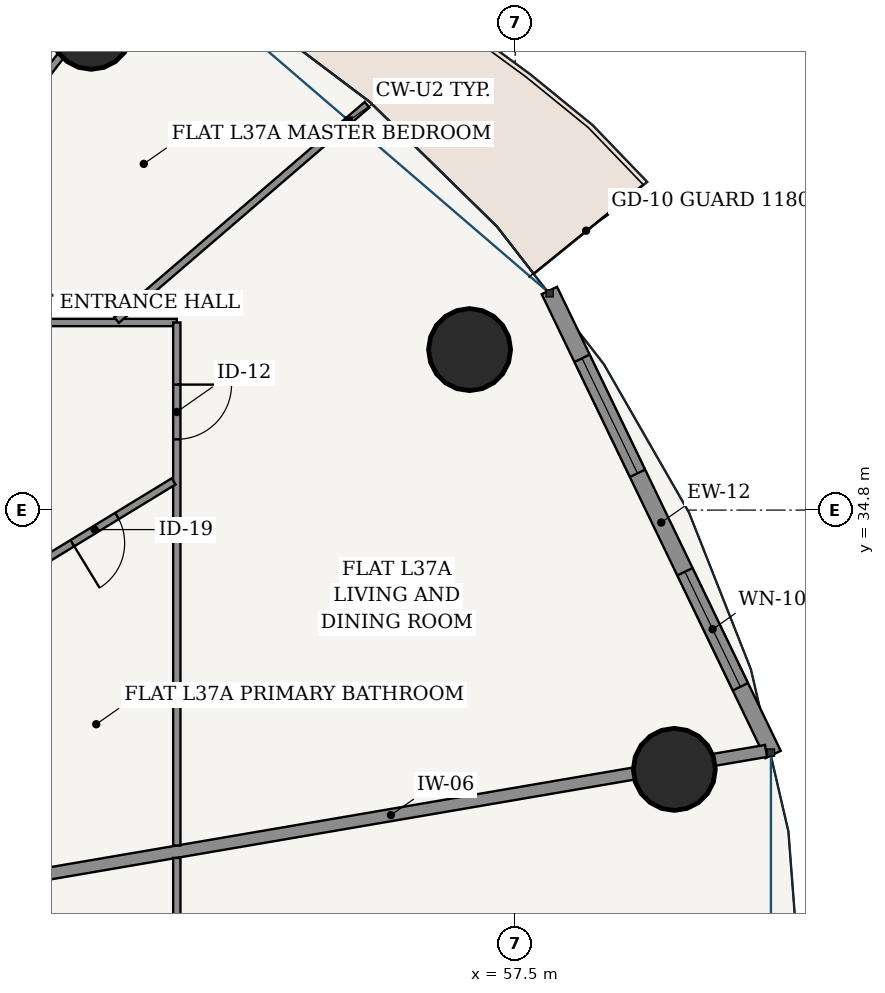
"""IFC4 building model, lengths in metres.
Left out: names, types, materials, properties, quantities, classifications, styles, units other than length and angle.
Written with IfcOpenShell. Run it as: python <this file> out.ifc"""

import sys

from ifc_helpers import new_model, si_unit, direction, frame, frame_2d, origin, origin_2d, place, context, subcontext, project, spatial, rectangle, hollow_circle, extrude, source, transform, mapped, element, fill, save


model = new_model("IFC4")
c1 = context("Model", 3, precision=1e-05, world=origin(), true_north=direction((-0.2419218956, 0.970295726276)))
c2 = subcontext(c1, "Body", "Model", "MODEL_VIEW")
j1 = project(units=[si_unit("LENGTHUNIT", "METRE"), si_unit("PLANEANGLEUNIT", "RADIAN")], contexts=[c1])
p1 = place(None, origin())
s1 = spatial("IfcSite", under=j1, at=p1, CompositionType="ELEMENT")
p2 = place(p1, origin())
s2 = spatial("IfcBuilding", under=s1, at=p2, CompositionType="ELEMENT")
p3 = place(p2, frame((0.0, 0.0, 142.6)))
s3 = spatial("IfcBuildingStorey", under=s2, at=p3, CompositionType="ELEMENT", Elevation=142.6)
for number, where, z_axis, x_axis in (
    (1, (60.117, 30.536, 0.0), (0.0, 0.0, 1.0), (1.0, 0.0, 0.0)),
    (2, (56.75, 37.439, 0.0), (0.0, 0.0, 1.0), (1.0, 0.0, 0.0)),
    (3, (50.528, 42.723, 0.0), (0.0, 0.0, 1.0), (1.0, 0.0, 0.0)),
):
    element("IfcColumn", number, at=place(p3, frame(where, z_axis=z_axis, x_axis=x_axis)), inside=s3, PredefinedType="COLUMN", context=c2, shape_type="SweptSolid", body=[
        extrude(hollow_circle(Radius=0.675, WallThickness=0.042, at=origin_2d()), origin(), (0.0, 0.0, 1.0), 3.6),
    ])
p4 = place(p3, frame((61.74, 30.78, 0.0), z_axis=(0.0, 0.0, 1.0), x_axis=(-0.434209827226, 0.900811759437, 0.0)))
e4 = element("IfcWall", 4, at=p4, inside=s3, PredefinedType="SOLIDWALL", context=c2, shape_type="SweptSolid", body=[
    extrude(rectangle(XDim=8.472, YDim=0.28, at=frame_2d((4.236, 0.0))), origin(), (0.0, 0.0, 1.0), 3.33),
])
p5 = place(p4, frame((1.237, 0.0, 0.85)))
e5 = element("IfcOpeningElement", 5, at=p5, cuts=e4, PredefinedType="OPENING", context=c2, shape_type="SweptSolid", body=[
    extrude(rectangle(XDim=2.1, YDim=1.95, at=frame_2d((1.05, 0.975))), frame((0.0, 0.15, 0.0), z_axis=(0.0, -1.0, 0.0), x_axis=(1.0, 0.0, 0.0)), (0.0, 0.0, 1.0), 0.3),
])
p6 = place(p4, frame((5.134, 0.0, 0.85)))
e6 = element("IfcOpeningElement", 6, at=p6, cuts=e4, PredefinedType="OPENING", context=c2, shape_type="SweptSolid", body=[
    extrude(rectangle(XDim=2.1, YDim=1.95, at=frame_2d((1.05, 0.975))), frame((0.0, 0.15, 0.0), z_axis=(0.0, -1.0, 0.0), x_axis=(1.0, 0.0, 0.0)), (0.0, 0.0, 1.0), 0.3),
])
p7 = place(p3, frame((49.287, 28.73, 0.0), z_axis=(0.0, 0.0, 1.0), x_axis=(0.985698993845, 0.168515558725, 0.0)))
e7 = element("IfcWall", 7, at=p7, inside=s3, PredefinedType="PARTITIONING", context=c2, shape_type="SweptSolid", body=[
    extrude(rectangle(XDim=12.517, YDim=0.2, at=frame_2d((6.259, 0.0))), origin(), (0.0, 0.0, 1.0), 2.776),
])
p8 = place(p3, frame((44.465, 37.885, 0.0), z_axis=(0.0, 0.0, 1.0), x_axis=(1.0, 0.0, 0.0)))
e8 = element("IfcWall", 8, at=p8, inside=s3, PredefinedType="PARTITIONING", context=c2, shape_type="SweptSolid", body=[
    extrude(rectangle(XDim=7.47, YDim=0.12, at=frame_2d((3.735, 0.0))), origin(), (0.0, 0.0, 1.0), 2.776),
])
p9 = place(p3, frame((51.935, 37.885, 0.0), z_axis=(0.0, 0.0, 1.0), x_axis=(0.0, -1.0, 0.0)))
e9 = element("IfcWall", 9, at=p9, inside=s3, PredefinedType="PARTITIONING", context=c2, shape_type="SweptSolid", body=[
    extrude(rectangle(XDim=8.601, YDim=0.12, at=frame_2d((4.3, 0.0))), origin(), (0.0, 0.0, 1.0), 2.776),
])
p10 = place(p9, frame((1.021, 0.0, 0.0)))
e10 = element("IfcOpeningElement", 10, at=p10, cuts=e9, PredefinedType="OPENING", context=c2, shape_type="SweptSolid", body=[
    extrude(rectangle(XDim=0.9, YDim=2.15, at=frame_2d((0.45, 1.075))), frame((0.0, 0.07, 0.0), z_axis=(0.0, -1.0, 0.0), x_axis=(1.0, 0.0, 0.0)), (0.0, 0.0, 1.0), 0.14),
])
p11 = place(p3, frame((50.944, 37.925, 0.0), z_axis=(0.0, 0.0, 1.0), x_axis=(0.758354915574, 0.65184186888, 0.0)))
e11 = element("IfcWall", 11, at=p11, inside=s3, PredefinedType="PARTITIONING", context=c2, shape_type="SweptSolid", body=[
    extrude(rectangle(XDim=5.432, YDim=0.12, at=frame_2d((2.716, 0.0))), origin(), (0.0, 0.0, 1.0), 2.846),
])
p12 = place(p3, frame((46.656, 37.934, 0.0), z_axis=(0.0, 0.0, 1.0), x_axis=(0.613758289074, 0.789493991487, 0.0)))
e12 = element("IfcWall", 12, at=p12, inside=s3, PredefinedType="PARTITIONING", context=c2, shape_type="SweptSolid", body=[
    extrude(rectangle(XDim=7.695, YDim=0.12, at=frame_2d((3.848, 0.0))), origin(), (0.0, 0.0, 1.0), 2.776),
])
p13 = place(p12, frame((2.395, 0.0, 0.0)))
e13 = element("IfcOpeningElement", 13, at=p13, cuts=e12, PredefinedType="OPENING", context=c2, shape_type="SweptSolid", body=[
    extrude(rectangle(XDim=0.9, YDim=2.15, at=frame_2d((0.45, 1.075))), frame((0.0, 0.07, 0.0), z_axis=(0.0, -1.0, 0.0), x_axis=(1.0, 0.0, 0.0)), (0.0, 0.0, 1.0), 0.14),
])
p14 = place(p3, frame((49.287, 33.688, 0.0), z_axis=(0.0, 0.0, 1.0), x_axis=(0.853628993111, 0.520881504874, 0.0)))
e14 = element("IfcWall", 14, at=p14, inside=s3, PredefinedType="PARTITIONING", context=c2, shape_type="SweptSolid", body=[
    extrude(rectangle(XDim=3.041, YDim=0.12, at=frame_2d((1.52, 0.0))), origin(), (0.0, 0.0, 1.0), 3.005),
])
p15 = place(p14, frame((1.09, 0.0, 0.0)))
e15 = element("IfcOpeningElement", 15, at=p15, cuts=e14, PredefinedType="OPENING", context=c2, shape_type="SweptSolid", body=[
    extrude(rectangle(XDim=0.86, YDim=2.15, at=frame_2d((0.43, 1.075))), frame((0.0, 0.07, 0.0), z_axis=(0.0, -1.0, 0.0), x_axis=(1.0, 0.0, 0.0)), (0.0, 0.0, 1.0), 0.14),
])
p16 = place(p3, frame((51.935, 29.08, 0.0), z_axis=(0.0, 0.0, 1.0), x_axis=(0.0, -1.0, 0.0)))
e16 = element("IfcWall", 16, at=p16, inside=s3, PredefinedType="PARTITIONING", context=c2, shape_type="SweptSolid", body=[
    extrude(rectangle(XDim=15.215, YDim=0.12, at=frame_2d((7.608, 0.0))), origin(), (0.0, 0.0, 1.0), 2.776),
])
p17 = place(p16, frame((11.859, 0.0, 0.0)))
e17 = element("IfcOpeningElement", 17, at=p17, cuts=e16, PredefinedType="OPENING", context=c2, shape_type="SweptSolid", body=[
    extrude(rectangle(XDim=0.9, YDim=2.15, at=frame_2d((0.45, 1.075))), frame((0.0, 0.07, 0.0), z_axis=(0.0, -1.0, 0.0), x_axis=(1.0, 0.0, 0.0)), (0.0, 0.0, 1.0), 0.14),
])
p18 = place(p16, frame((7.49, 0.0, 0.0)))
e18 = element("IfcOpeningElement", 18, at=p18, cuts=e16, PredefinedType="OPENING", context=c2, shape_type="SweptSolid", body=[
    extrude(rectangle(XDim=0.9, YDim=2.15, at=frame_2d((0.45, 1.075))), frame((0.0, 0.07, 0.0), z_axis=(0.0, -1.0, 0.0), x_axis=(1.0, 0.0, 0.0)), (0.0, 0.0, 1.0), 0.14),
])
m1 = source(origin(), c2, "Body", "SweptSolid", [
    extrude(rectangle(XDim=2.1, YDim=1.95, at=frame_2d((1.05, 0.975))), frame((0.0, 0.03, 0.0), z_axis=(0.0, -1.0, 0.0), x_axis=(1.0, 0.0, 0.0)), (0.0, 0.0, 1.0), 0.06),
])
p19 = place(p5, origin())
e19 = element("IfcWindow", 19, at=p19, inside=s3, PartitioningType="SINGLE_PANEL", PredefinedType="WINDOW", context=c2, shape_type="MappedRepresentation", body=[
    mapped(m1, transform((0.0, 0.0, 0.0), scale=1.0)),
])
fill(e5, e19)
p20 = place(p6, origin())
e20 = element("IfcWindow", 20, at=p20, inside=s3, PartitioningType="SINGLE_PANEL", PredefinedType="WINDOW", context=c2, shape_type="MappedRepresentation", body=[
    mapped(m1, transform((0.0, 0.0, 0.0), scale=1.0)),
])
fill(e6, e20)
m2 = source(origin(), c2, "Body", "SweptSolid", [
    extrude(rectangle(XDim=0.86, YDim=2.15, at=frame_2d((0.43, 1.075))), frame((0.0, 0.025, 0.0), z_axis=(0.0, -1.0, 0.0), x_axis=(1.0, 0.0, 0.0)), (0.0, 0.0, 1.0), 0.05),
])
p21 = place(p15, frame((0.86, 0.0, 0.0), z_axis=(0.0, 0.0, 1.0), x_axis=(-1.0, 0.0, 0.0)))
e21 = element("IfcDoor", 21, at=p21, inside=s3, OperationType="SINGLE_SWING_RIGHT", PredefinedType="DOOR", context=c2, shape_type="MappedRepresentation", body=[
    mapped(m2, transform((0.0, 0.0, 0.0), scale=1.0)),
])
fill(e15, e21)
m3 = source(origin(), c2, "Body", "SweptSolid", [
    extrude(rectangle(XDim=0.9, YDim=2.15, at=frame_2d((0.45, 1.075))), frame((0.0, 0.025, 0.0), z_axis=(0.0, -1.0, 0.0), x_axis=(1.0, 0.0, 0.0)), (0.0, 0.0, 1.0), 0.05),
])
p22 = place(p10, origin())
e22 = element("IfcDoor", 22, at=p22, inside=s3, OperationType="SINGLE_SWING_LEFT", PredefinedType="DOOR", context=c2, shape_type="MappedRepresentation", body=[
    mapped(m3, transform((0.0, 0.0, 0.0), scale=1.0)),
])
fill(e10, e22)
save(model, sys.argv[1])
